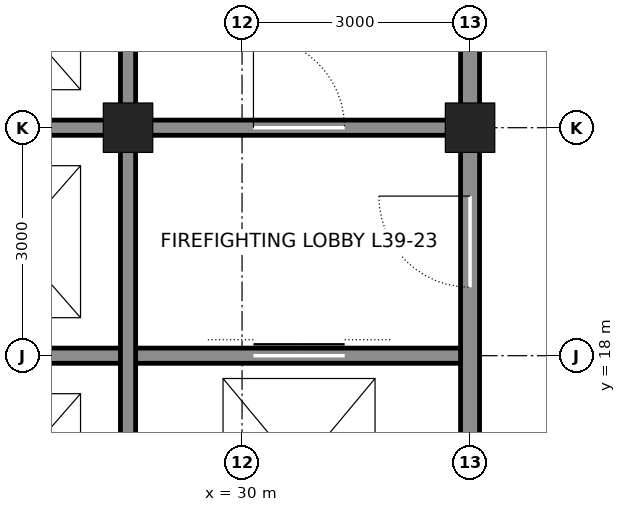
"""IFC4 building model, lengths in metres.
Left out: names, types, materials, properties, quantities, classifications, styles, units other than length and angle.
Written with IfcOpenShell. Run it as: python <this file> out.ifc"""

import sys

from ifc_helpers import new_model, si_unit, direction, frame, frame_2d, origin, origin_2d, place, context, subcontext, project, spatial, rectangle, hollow_rectangle, extrude, element, fill, save


model = new_model("IFC4")
c1 = context("Model", 3, precision=1e-05, world=origin(), true_north=direction((0.0, 1.0)))
c2 = subcontext(c1, "Body", "Model", "MODEL_VIEW")
j1 = project(units=[si_unit("LENGTHUNIT", "METRE"), si_unit("PLANEANGLEUNIT", "RADIAN")], contexts=[c1])
p1 = place(None, origin())
s1 = spatial("IfcSite", under=j1, at=p1, CompositionType="ELEMENT")
p2 = place(p1, origin())
s2 = spatial("IfcBuilding", under=s1, at=p2, CompositionType="ELEMENT")
p3 = place(p2, frame((0.0, 0.0, 180.0)))
s3 = spatial("IfcBuildingStorey", under=s2, at=p3, CompositionType="ELEMENT", Elevation=180.0)
for number, where, z_axis, x_axis in (
    (1, (33.0, 21.0, 0.0), (0.0, 0.0, 1.0), (1.0, 0.0, 0.0)),
    (2, (28.5, 21.0, 0.0), (0.0, 0.0, 1.0), (1.0, 0.0, 0.0)),
):
    element("IfcColumn", number, at=place(p3, frame(where, z_axis=z_axis, x_axis=x_axis)), inside=s3, PredefinedType="COLUMN", context=c2, shape_type="SweptSolid", body=[
        extrude(hollow_rectangle(XDim=0.65, YDim=0.65, WallThickness=0.065, at=origin_2d()), origin(), (0.0, 0.0, 1.0), 4.5),
    ])
p4 = place(p3, frame((25.5, 18.0, 0.0), z_axis=(0.0, 0.0, 1.0), x_axis=(1.0, 0.0, 0.0)))
e3 = element("IfcWall", 3, at=p4, inside=s3, PredefinedType="SOLIDWALL", context=c2, shape_type="SweptSolid", body=[
    extrude(rectangle(XDim=7.5, YDim=0.2, at=frame_2d((3.75, 0.0))), origin(), (0.0, 0.0, 1.0), 4.34),
])
p5 = place(p4, frame((4.65, 0.0, 0.0)))
e4 = element("IfcOpeningElement", 4, at=p5, cuts=e3, PredefinedType="OPENING", context=c2, shape_type="SweptSolid", body=[
    extrude(rectangle(XDim=1.2, YDim=2.1, at=frame_2d((0.6, 1.05))), frame((0.0, 0.11, 0.0), z_axis=(0.0, -1.0, 0.0), x_axis=(1.0, 0.0, 0.0)), (0.0, 0.0, 1.0), 0.22),
])
p6 = place(p3, frame((25.5, 21.0, 0.0), z_axis=(0.0, 0.0, 1.0), x_axis=(1.0, 0.0, 0.0)))
e5 = element("IfcWall", 5, at=p6, inside=s3, PredefinedType="SOLIDWALL", context=c2, shape_type="SweptSolid", body=[
    extrude(rectangle(XDim=2.75, YDim=0.2, at=frame_2d((1.375, 0.0))), origin(), (0.0, 0.0, 1.0), 3.39),
])
p7 = place(p3, frame((28.75, 21.0, 0.0), z_axis=(0.0, 0.0, 1.0), x_axis=(1.0, 0.0, 0.0)))
e6 = element("IfcWall", 6, at=p7, inside=s3, PredefinedType="SOLIDWALL", context=c2, shape_type="SweptSolid", body=[
    extrude(rectangle(XDim=4.0, YDim=0.2, at=frame_2d((2.0, 0.0))), origin(), (0.0, 0.0, 1.0), 3.39),
])
p8 = place(p7, frame((1.4, 0.0, 0.0)))
e7 = element("IfcOpeningElement", 7, at=p8, cuts=e6, PredefinedType="OPENING", context=c2, shape_type="SweptSolid", body=[
    extrude(rectangle(XDim=1.2, YDim=2.1, at=frame_2d((0.6, 1.05))), frame((0.0, 0.11, 0.0), z_axis=(0.0, -1.0, 0.0), x_axis=(1.0, 0.0, 0.0)), (0.0, 0.0, 1.0), 0.22),
])
p9 = place(p3, frame((28.5, 12.25, 0.0), z_axis=(0.0, 0.0, 1.0), x_axis=(0.0, 1.0, 0.0)))
e8 = element("IfcWall", 8, at=p9, inside=s3, PredefinedType="SOLIDWALL", context=c2, shape_type="SweptSolid", body=[
    extrude(rectangle(XDim=8.5, YDim=0.2, at=frame_2d((4.25, 0.0))), origin(), (0.0, 0.0, 1.0), 3.413),
])
p10 = place(p3, frame((28.5, 21.25, 0.0), z_axis=(0.0, 0.0, 1.0), x_axis=(0.0, 1.0, 0.0)))
e9 = element("IfcWall", 9, at=p10, inside=s3, PredefinedType="SOLIDWALL", context=c2, shape_type="SweptSolid", body=[
    extrude(rectangle(XDim=2.5, YDim=0.2, at=frame_2d((1.25, 0.0))), origin(), (0.0, 0.0, 1.0), 3.413),
])
p11 = place(p3, frame((33.0, 12.25, 0.0), z_axis=(0.0, 0.0, 1.0), x_axis=(0.0, 1.0, 0.0)))
e10 = element("IfcWall", 10, at=p11, inside=s3, PredefinedType="SOLIDWALL", context=c2, shape_type="SweptSolid", body=[
    extrude(rectangle(XDim=8.5, YDim=0.25, at=frame_2d((4.25, 0.0))), origin(), (0.0, 0.0, 1.0), 3.413),
])
p12 = place(p11, frame((6.65, 0.0, 0.0)))
e11 = element("IfcOpeningElement", 11, at=p12, cuts=e10, PredefinedType="OPENING", context=c2, shape_type="SweptSolid", body=[
    extrude(rectangle(XDim=1.2, YDim=2.1, at=frame_2d((0.6, 1.05))), frame((0.0, 0.135, 0.0), z_axis=(0.0, -1.0, 0.0), x_axis=(1.0, 0.0, 0.0)), (0.0, 0.0, 1.0), 0.27),
])
p13 = place(p11, frame((0.875, 0.0, 0.0)))
e12 = element("IfcOpeningElement", 12, at=p13, cuts=e10, PredefinedType="OPENING", context=c2, shape_type="SweptSolid", body=[
    extrude(rectangle(XDim=0.75, YDim=2.1, at=frame_2d((0.375, 1.05))), frame((0.0, 0.135, 0.0), z_axis=(0.0, -1.0, 0.0), x_axis=(1.0, 0.0, 0.0)), (0.0, 0.0, 1.0), 0.27),
])
p14 = place(p3, frame((33.0, 21.25, 0.0), z_axis=(0.0, 0.0, 1.0), x_axis=(0.0, 1.0, 0.0)))
e13 = element("IfcWall", 13, at=p14, inside=s3, PredefinedType="SOLIDWALL", context=c2, shape_type="SweptSolid", body=[
    extrude(rectangle(XDim=2.5, YDim=0.25, at=frame_2d((1.25, 0.0))), origin(), (0.0, 0.0, 1.0), 3.413),
])
p15 = place(p8, origin())
e14 = element("IfcDoor", 14, at=p15, inside=s3, OperationType="SINGLE_SWING_LEFT", PredefinedType="DOOR", context=c2, shape_type="SweptSolid", body=[
    extrude(rectangle(XDim=1.2, YDim=2.1, at=frame_2d((0.6, 1.05))), frame((0.0, 0.025, 0.0), z_axis=(0.0, -1.0, 0.0), x_axis=(1.0, 0.0, 0.0)), (0.0, 0.0, 1.0), 0.05),
])
fill(e7, e14)
p16 = place(p12, origin())
e15 = element("IfcDoor", 15, at=p16, inside=s3, OperationType="SINGLE_SWING_RIGHT", PredefinedType="DOOR", context=c2, shape_type="SweptSolid", body=[
    extrude(rectangle(XDim=1.2, YDim=2.1, at=frame_2d((0.6, 1.05))), frame((0.0, 0.025, 0.0), z_axis=(0.0, -1.0, 0.0), x_axis=(1.0, 0.0, 0.0)), (0.0, 0.0, 1.0), 0.05),
])
fill(e11, e15)
p17 = place(p5, origin())
e16 = element("IfcDoor", 16, at=p17, inside=s3, OperationType="DOUBLE_DOOR_SLIDING", PredefinedType="DOOR", context=c2, shape_type="SweptSolid", body=[
    extrude(rectangle(XDim=1.2, YDim=2.1, at=frame_2d((0.6, 1.05))), frame((0.0, 0.025, 0.0), z_axis=(0.0, -1.0, 0.0), x_axis=(1.0, 0.0, 0.0)), (0.0, 0.0, 1.0), 0.05),
])
fill(e4, e16)
save(model, sys.argv[1])
